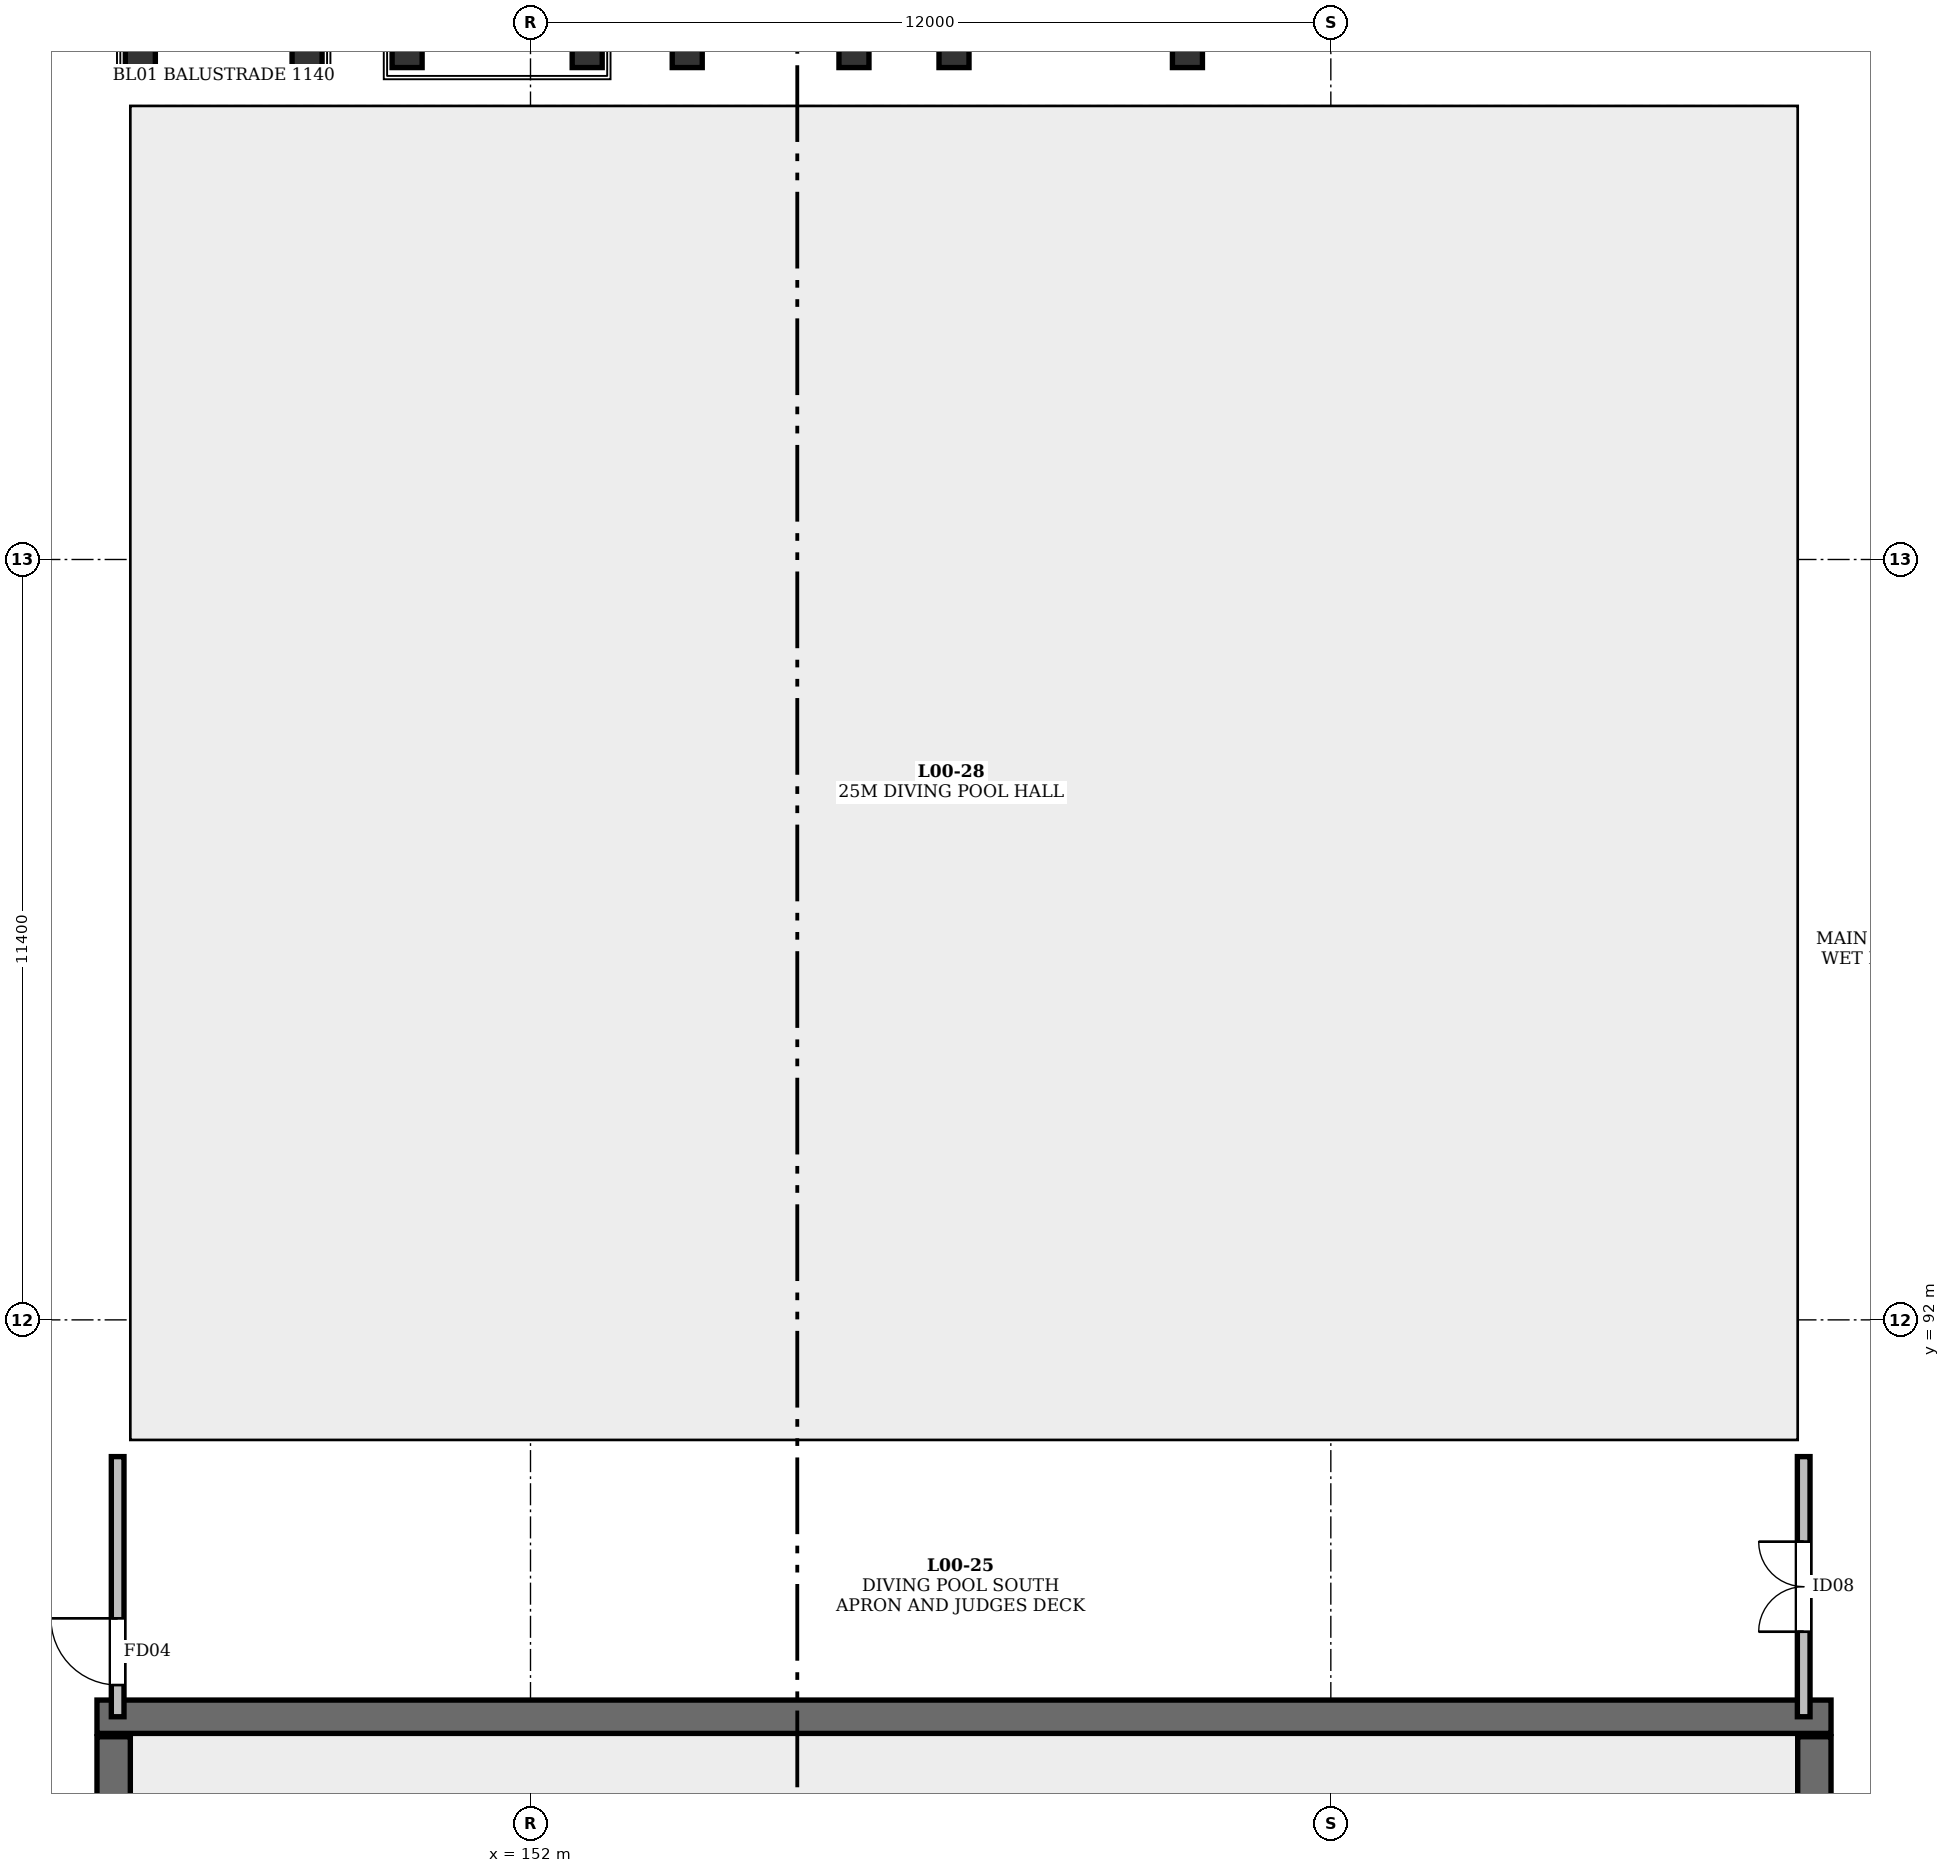
"""IFC4 building model, lengths in metres.
Left out: names, types, materials, properties, quantities, classifications, styles, units other than length and angle.
Written with IfcOpenShell. Run it as: python <this file> out.ifc"""

import sys

from ifc_helpers import new_model, si_unit, direction, frame, frame_2d, origin, origin_2d, place, context, subcontext, project, spatial, rectangle, extrude, element, fill, save


model = new_model("IFC4")
c1 = context("Model", 3, precision=1e-05, world=origin(), true_north=direction((0.0, 1.0)))
c2 = subcontext(c1, "Body", "Model", "MODEL_VIEW")
j1 = project(units=[si_unit("LENGTHUNIT", "METRE"), si_unit("PLANEANGLEUNIT", "RADIAN")], contexts=[c1])
p1 = place(None, origin())
s1 = spatial("IfcSite", under=j1, at=p1, CompositionType="ELEMENT")
p2 = place(p1, origin())
s2 = spatial("IfcBuilding", under=s1, at=p2, CompositionType="ELEMENT")
p3 = place(p2, origin())
s3 = spatial("IfcBuildingStorey", under=s2, at=p3, CompositionType="ELEMENT", Elevation=0.0)
p4 = place(p3, frame((145.5, 86.05, -2.5), z_axis=(0.0, 0.0, 1.0), x_axis=(1.0, 0.0, 0.0)))
e1 = element("IfcWall", 1, at=p4, inside=s3, PredefinedType="SHEAR", context=c2, shape_type="SweptSolid", body=[
    extrude(rectangle(XDim=26.0, YDim=0.5, at=frame_2d((13.0, 0.0))), origin(), (0.0, 0.0, 1.0), 2.22),
])
for number, where, z_axis, x_axis in (
    (2, (145.75, 35.85, -2.5), (0.0, 0.0, 1.0), (0.0, 1.0, 0.0)),
    (3, (171.25, 35.85, -2.5), (0.0, 0.0, 1.0), (0.0, 1.0, 0.0)),
):
    element("IfcWall", number, at=place(p3, frame(where, z_axis=z_axis, x_axis=x_axis)), inside=s3, PredefinedType="SHEAR", context=c2, shape_type="SweptSolid", body=[
        extrude(rectangle(XDim=49.9, YDim=0.5, at=frame_2d((24.95, 0.0))), origin(), (0.0, 0.0, 1.0), 2.22),
    ])
for number, where, z_axis, x_axis in (
    (4, (146.15, 111.0, 0.0), (0.0, 0.0, 1.0), (1.0, 0.0, 0.0)),
    (5, (148.65, 111.0, 0.0), (0.0, 0.0, 1.0), (1.0, 0.0, 0.0)),
):
    element("IfcColumn", number, at=place(p3, frame(where, z_axis=z_axis, x_axis=x_axis)), inside=s3, PredefinedType="COLUMN", context=c2, shape_type="SweptSolid", body=[
        extrude(rectangle(XDim=0.45, YDim=0.45, at=origin_2d()), origin(), (0.0, 0.0, 1.0), 2.8),
    ])
for number, where, z_axis, x_axis in (
    (6, (150.15, 111.0, 0.0), (0.0, 0.0, 1.0), (1.0, 0.0, 0.0)),
    (7, (152.85, 111.0, 0.0), (0.0, 0.0, 1.0), (1.0, 0.0, 0.0)),
):
    element("IfcColumn", number, at=place(p3, frame(where, z_axis=z_axis, x_axis=x_axis)), inside=s3, PredefinedType="COLUMN", context=c2, shape_type="SweptSolid", body=[
        extrude(rectangle(XDim=0.45, YDim=0.45, at=origin_2d()), origin(), (0.0, 0.0, 1.0), 4.8),
    ])
for number, where, z_axis, x_axis in (
    (8, (154.35, 111.0, 0.0), (0.0, 0.0, 1.0), (1.0, 0.0, 0.0)),
    (9, (156.85, 111.0, 0.0), (0.0, 0.0, 1.0), (1.0, 0.0, 0.0)),
    (10, (158.35, 111.0, 0.0), (0.0, 0.0, 1.0), (1.0, 0.0, 0.0)),
    (11, (161.85, 111.0, 0.0), (0.0, 0.0, 1.0), (1.0, 0.0, 0.0)),
):
    element("IfcColumn", number, at=place(p3, frame(where, z_axis=z_axis, x_axis=x_axis)), inside=s3, PredefinedType="COLUMN", context=c2, shape_type="SweptSolid", body=[
        extrude(rectangle(XDim=0.45, YDim=0.45, at=origin_2d()), origin(), (0.0, 0.0, 1.0), 5.4),
    ])
p5 = place(p3, frame((145.81, 86.05, 0.0), z_axis=(0.0, 0.0, 1.0), x_axis=(0.0, 1.0, 0.0)))
e12 = element("IfcWall", 12, at=p5, inside=s3, PredefinedType="SOLIDWALL", context=c2, shape_type="SweptSolid", body=[
    extrude(rectangle(XDim=3.9, YDim=0.19, at=frame_2d((1.95, 0.0))), origin(), (0.0, 0.0, 1.0), 5.16),
])
p6 = place(p5, frame((0.475, 0.0, 0.0)))
e13 = element("IfcOpeningElement", 13, at=p6, cuts=e12, PredefinedType="OPENING", context=c2, shape_type="SweptSolid", body=[
    extrude(rectangle(XDim=1.0, YDim=2.2, at=frame_2d((0.5, 1.1))), frame((0.0, 0.107, 0.0), z_axis=(0.0, -1.0, 0.0), x_axis=(1.0, 0.0, 0.0)), (0.0, 0.0, 1.0), 0.214),
])
p7 = place(p3, frame((171.09, 86.05, 0.0), z_axis=(0.0, 0.0, 1.0), x_axis=(0.0, 1.0, 0.0)))
e14 = element("IfcWall", 14, at=p7, inside=s3, PredefinedType="SOLIDWALL", context=c2, shape_type="SweptSolid", body=[
    extrude(rectangle(XDim=3.9, YDim=0.19, at=frame_2d((1.95, 0.0))), origin(), (0.0, 0.0, 1.0), 5.16),
])
p8 = place(p7, frame((1.275, 0.0, 0.0)))
e15 = element("IfcOpeningElement", 15, at=p8, cuts=e14, PredefinedType="OPENING", context=c2, shape_type="SweptSolid", body=[
    extrude(rectangle(XDim=1.35, YDim=2.2, at=frame_2d((0.675, 1.1))), frame((0.0, 0.107, 0.0), z_axis=(0.0, -1.0, 0.0), x_axis=(1.0, 0.0, 0.0)), (0.0, 0.0, 1.0), 0.214),
])
p9 = place(p6, origin())
e16 = element("IfcDoor", 16, at=p9, inside=s3, OperationType="SINGLE_SWING_RIGHT", PredefinedType="DOOR", context=c2, shape_type="SweptSolid", body=[
    extrude(rectangle(XDim=1.0, YDim=2.2, at=frame_2d((0.5, 1.1))), frame((0.0, 0.025, 0.0), z_axis=(0.0, -1.0, 0.0), x_axis=(1.0, 0.0, 0.0)), (0.0, 0.0, 1.0), 0.05),
])
fill(e13, e16)
p10 = place(p8, origin())
e17 = element("IfcDoor", 17, at=p10, inside=s3, OperationType="DOUBLE_DOOR_SINGLE_SWING", PredefinedType="DOOR", context=c2, shape_type="SweptSolid", body=[
    extrude(rectangle(XDim=1.35, YDim=2.2, at=frame_2d((0.675, 1.1))), frame((0.0, 0.025, 0.0), z_axis=(0.0, -1.0, 0.0), x_axis=(1.0, 0.0, 0.0)), (0.0, 0.0, 1.0), 0.05),
])
fill(e15, e17)
save(model, sys.argv[1])
